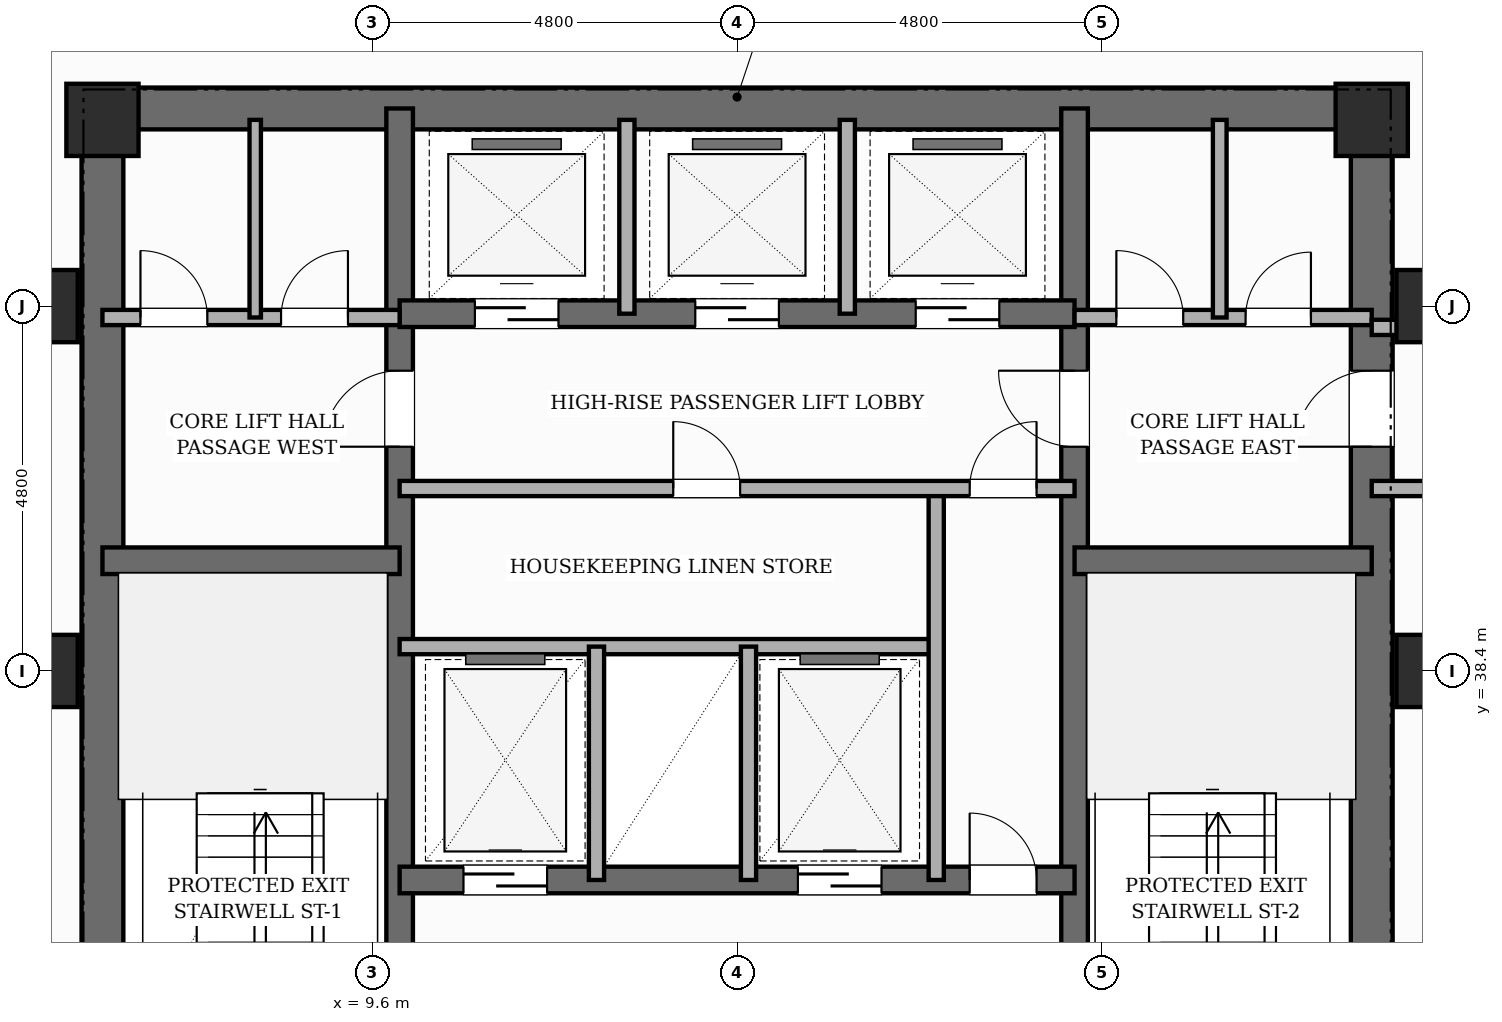
"""IFC4 building model, lengths in metres.
Left out: names, types, materials, properties, quantities, classifications, styles, units other than length and angle.
Written with IfcOpenShell. Run it as: python <this file> out.ifc"""

import sys

from ifc_helpers import new_model, si_unit, direction, frame, frame_2d, origin, origin_2d, place, context, subcontext, project, spatial, rectangle, extrude, element, fill, save


model = new_model("IFC4")
c1 = context("Model", 3, precision=1e-05, world=origin(), true_north=direction((0.0, 1.0)))
c2 = subcontext(c1, "Body", "Model", "MODEL_VIEW")
j1 = project(units=[si_unit("LENGTHUNIT", "METRE"), si_unit("PLANEANGLEUNIT", "RADIAN")], contexts=[c1])
p1 = place(None, origin())
s1 = spatial("IfcSite", under=j1, at=p1, CompositionType="ELEMENT")
p2 = place(p1, origin())
s2 = spatial("IfcBuilding", under=s1, at=p2, CompositionType="ELEMENT")
p3 = place(p2, frame((0.0, 0.0, 198.4)))
s3 = spatial("IfcBuildingStorey", under=s2, at=p3, CompositionType="ELEMENT", Elevation=198.4)
p4 = place(p3, frame((6.05, 30.625, 0.0), z_axis=(0.0, 0.0, 1.0), x_axis=(0.0, 1.0, 0.0)))
e1 = element("IfcWall", 1, at=p4, inside=s3, PredefinedType="SHEAR", context=c2, shape_type="SweptSolid", body=[
    extrude(rectangle(XDim=15.45, YDim=0.55, at=frame_2d((7.725, 0.0))), origin(), (0.0, 0.0, 1.0), 5.4),
])
p5 = place(p3, frame((22.75, 30.625, 0.0), z_axis=(0.0, 0.0, 1.0), x_axis=(0.0, 1.0, 0.0)))
e2 = element("IfcWall", 2, at=p5, inside=s3, PredefinedType="SHEAR", context=c2, shape_type="SweptSolid", body=[
    extrude(rectangle(XDim=15.45, YDim=0.55, at=frame_2d((7.725, 0.0))), origin(), (0.0, 0.0, 1.0), 5.4),
])
p6 = place(p5, frame((10.725, 0.0, 0.0)))
e3 = element("IfcOpeningElement", 3, at=p6, cuts=e2, PredefinedType="OPENING", context=c2, shape_type="SweptSolid", body=[
    extrude(rectangle(XDim=1.0, YDim=2.15, at=frame_2d((0.5, 1.075))), frame((0.0, 0.285, 0.0), z_axis=(0.0, -1.0, 0.0), x_axis=(1.0, 0.0, 0.0)), (0.0, 0.0, 1.0), 0.57),
])
p7 = place(p3, frame((6.05, 45.8, 0.0), z_axis=(0.0, 0.0, 1.0), x_axis=(1.0, 0.0, 0.0)))
e4 = element("IfcWall", 4, at=p7, inside=s3, PredefinedType="SHEAR", context=c2, shape_type="SweptSolid", body=[
    extrude(rectangle(XDim=16.7, YDim=0.55, at=frame_2d((8.35, 0.0))), origin(), (0.0, 0.0, 1.0), 5.4),
])
p8 = place(p3, frame((9.96, 30.9, 0.0), z_axis=(0.0, 0.0, 1.0), x_axis=(0.0, 1.0, 0.0)))
e5 = element("IfcWall", 5, at=p8, inside=s3, PredefinedType="SHEAR", context=c2, shape_type="SweptSolid", body=[
    extrude(rectangle(XDim=14.9, YDim=0.35, at=frame_2d((7.45, 0.0))), origin(), (0.0, 0.0, 1.0), 5.4),
])
p9 = place(p8, frame((0.65, 0.0, 0.0)))
e6 = element("IfcOpeningElement", 6, at=p9, cuts=e5, PredefinedType="OPENING", context=c2, shape_type="SweptSolid", body=[
    extrude(rectangle(XDim=0.95, YDim=2.1, at=frame_2d((0.475, 1.05))), frame((0.0, 0.185, 0.0), z_axis=(0.0, -1.0, 0.0), x_axis=(1.0, 0.0, 0.0)), (0.0, 0.0, 1.0), 0.37),
])
p10 = place(p8, frame((10.45, 0.0, 0.0)))
e7 = element("IfcOpeningElement", 7, at=p10, cuts=e5, PredefinedType="OPENING", context=c2, shape_type="SweptSolid", body=[
    extrude(rectangle(XDim=1.0, YDim=2.15, at=frame_2d((0.5, 1.075))), frame((0.0, 0.185, 0.0), z_axis=(0.0, -1.0, 0.0), x_axis=(1.0, 0.0, 0.0)), (0.0, 0.0, 1.0), 0.37),
])
p11 = place(p3, frame((18.84, 30.9, 0.0), z_axis=(0.0, 0.0, 1.0), x_axis=(0.0, 1.0, 0.0)))
e8 = element("IfcWall", 8, at=p11, inside=s3, PredefinedType="SHEAR", context=c2, shape_type="SweptSolid", body=[
    extrude(rectangle(XDim=14.9, YDim=0.35, at=frame_2d((7.45, 0.0))), origin(), (0.0, 0.0, 1.0), 5.4),
])
p12 = place(p11, frame((0.65, 0.0, 0.0)))
e9 = element("IfcOpeningElement", 9, at=p12, cuts=e8, PredefinedType="OPENING", context=c2, shape_type="SweptSolid", body=[
    extrude(rectangle(XDim=0.95, YDim=2.1, at=frame_2d((0.475, 1.05))), frame((0.0, 0.185, 0.0), z_axis=(0.0, -1.0, 0.0), x_axis=(1.0, 0.0, 0.0)), (0.0, 0.0, 1.0), 0.37),
])
p13 = place(p11, frame((10.45, 0.0, 0.0)))
e10 = element("IfcOpeningElement", 10, at=p13, cuts=e8, PredefinedType="OPENING", context=c2, shape_type="SweptSolid", body=[
    extrude(rectangle(XDim=1.0, YDim=2.15, at=frame_2d((0.5, 1.075))), frame((0.0, 0.185, 0.0), z_axis=(0.0, -1.0, 0.0), x_axis=(1.0, 0.0, 0.0)), (0.0, 0.0, 1.0), 0.37),
])
for number, where, z_axis, x_axis in (
    (11, (6.05, 39.85, 0.0), (0.0, 0.0, 1.0), (1.0, 0.0, 0.0)),
    (12, (18.84, 39.85, 0.0), (0.0, 0.0, 1.0), (1.0, 0.0, 0.0)),
):
    element("IfcWall", number, at=place(p3, frame(where, z_axis=z_axis, x_axis=x_axis)), inside=s3, PredefinedType="SHEAR", context=c2, shape_type="SweptSolid", body=[
        extrude(rectangle(XDim=3.91, YDim=0.35, at=frame_2d((1.955, 0.0))), origin(), (0.0, 0.0, 1.0), 5.4),
    ])
p14 = place(p3, frame((9.96, 35.65, 0.0), z_axis=(0.0, 0.0, 1.0), x_axis=(1.0, 0.0, 0.0)))
e13 = element("IfcWall", 13, at=p14, inside=s3, PredefinedType="SHEAR", context=c2, shape_type="SweptSolid", body=[
    extrude(rectangle(XDim=8.88, YDim=0.35, at=frame_2d((4.44, 0.0))), origin(), (0.0, 0.0, 1.0), 5.4),
])
p15 = place(p14, frame((0.84, 0.0, 0.0)))
e14 = element("IfcOpeningElement", 14, at=p15, cuts=e13, PredefinedType="OPENING", context=c2, shape_type="SweptSolid", body=[
    extrude(rectangle(XDim=1.1, YDim=2.15, at=frame_2d((0.55, 1.075))), frame((0.0, 0.185, 0.0), z_axis=(0.0, -1.0, 0.0), x_axis=(1.0, 0.0, 0.0)), (0.0, 0.0, 1.0), 0.37),
])
p16 = place(p14, frame((5.24, 0.0, 0.0)))
e15 = element("IfcOpeningElement", 15, at=p16, cuts=e13, PredefinedType="OPENING", context=c2, shape_type="SweptSolid", body=[
    extrude(rectangle(XDim=1.1, YDim=2.15, at=frame_2d((0.55, 1.075))), frame((0.0, 0.185, 0.0), z_axis=(0.0, -1.0, 0.0), x_axis=(1.0, 0.0, 0.0)), (0.0, 0.0, 1.0), 0.37),
])
p17 = place(p14, frame((7.5, 0.0, 0.0)))
e16 = element("IfcOpeningElement", 16, at=p17, cuts=e13, PredefinedType="OPENING", context=c2, shape_type="SweptSolid", body=[
    extrude(rectangle(XDim=0.88, YDim=2.1, at=frame_2d((0.44, 1.05))), frame((0.0, 0.185, 0.0), z_axis=(0.0, -1.0, 0.0), x_axis=(1.0, 0.0, 0.0)), (0.0, 0.0, 1.0), 0.37),
])
p18 = place(p3, frame((9.96, 43.1, 0.0), z_axis=(0.0, 0.0, 1.0), x_axis=(1.0, 0.0, 0.0)))
e17 = element("IfcWall", 17, at=p18, inside=s3, PredefinedType="SHEAR", context=c2, shape_type="SweptSolid", body=[
    extrude(rectangle(XDim=8.88, YDim=0.35, at=frame_2d((4.44, 0.0))), origin(), (0.0, 0.0, 1.0), 5.4),
])
p19 = place(p18, frame((0.99, 0.0, 0.0)))
e18 = element("IfcOpeningElement", 18, at=p19, cuts=e17, PredefinedType="OPENING", context=c2, shape_type="SweptSolid", body=[
    extrude(rectangle(XDim=1.1, YDim=2.15, at=frame_2d((0.55, 1.075))), frame((0.0, 0.185, 0.0), z_axis=(0.0, -1.0, 0.0), x_axis=(1.0, 0.0, 0.0)), (0.0, 0.0, 1.0), 0.37),
])
p20 = place(p18, frame((3.89, 0.0, 0.0)))
e19 = element("IfcOpeningElement", 19, at=p20, cuts=e17, PredefinedType="OPENING", context=c2, shape_type="SweptSolid", body=[
    extrude(rectangle(XDim=1.1, YDim=2.15, at=frame_2d((0.55, 1.075))), frame((0.0, 0.185, 0.0), z_axis=(0.0, -1.0, 0.0), x_axis=(1.0, 0.0, 0.0)), (0.0, 0.0, 1.0), 0.37),
])
p21 = place(p18, frame((6.79, 0.0, 0.0)))
e20 = element("IfcOpeningElement", 20, at=p21, cuts=e17, PredefinedType="OPENING", context=c2, shape_type="SweptSolid", body=[
    extrude(rectangle(XDim=1.1, YDim=2.15, at=frame_2d((0.55, 1.075))), frame((0.0, 0.185, 0.0), z_axis=(0.0, -1.0, 0.0), x_axis=(1.0, 0.0, 0.0)), (0.0, 0.0, 1.0), 0.37),
])
for number, where, z_axis, x_axis in (
    (21, (5.25, 38.4, 0.0), (0.0, 0.0, 1.0), (1.0, 0.0, 0.0)),
    (22, (5.25, 43.2, 0.0), (0.0, 0.0, 1.0), (1.0, 0.0, 0.0)),
    (23, (6.05, 45.65, 0.0), (0.0, 0.0, 1.0), (1.0, 0.0, 0.0)),
    (24, (22.75, 45.65, 0.0), (0.0, 0.0, 1.0), (1.0, 0.0, 0.0)),
    (25, (23.55, 38.4, 0.0), (0.0, 0.0, 1.0), (1.0, 0.0, 0.0)),
    (26, (23.55, 43.2, 0.0), (0.0, 0.0, 1.0), (1.0, 0.0, 0.0)),
):
    element("IfcColumn", number, at=place(p3, frame(where, z_axis=z_axis, x_axis=x_axis)), inside=s3, PredefinedType="COLUMN", context=c2, shape_type="SweptSolid", body=[
        extrude(rectangle(XDim=0.95, YDim=0.95, at=origin_2d()), origin(), (0.0, 0.0, 1.0), 5.4),
    ])
p22 = place(p3, frame((9.96, 38.72, 0.0), z_axis=(0.0, 0.0, 1.0), x_axis=(1.0, 0.0, 0.0)))
e27 = element("IfcWall", 27, at=p22, inside=s3, PredefinedType="POLYGONAL", context=c2, shape_type="SweptSolid", body=[
    extrude(rectangle(XDim=7.06, YDim=0.2, at=frame_2d((3.53, 0.0))), origin(), (0.0, 0.0, 1.0), 5.18),
])
for number, where, z_axis, x_axis in (
    (28, (12.55, 35.65, 0.0), (0.0, 0.0, 1.0), (0.0, 1.0, 0.0)),
    (29, (14.55, 35.65, 0.0), (0.0, 0.0, 1.0), (0.0, 1.0, 0.0)),
):
    element("IfcWall", number, at=place(p3, frame(where, z_axis=z_axis, x_axis=x_axis)), inside=s3, PredefinedType="POLYGONAL", context=c2, shape_type="SweptSolid", body=[
        extrude(rectangle(XDim=3.07, YDim=0.2, at=frame_2d((1.535, 0.0))), origin(), (0.0, 0.0, 1.0), 5.18),
    ])
p23 = place(p3, frame((17.02, 35.65, 0.0), z_axis=(0.0, 0.0, 1.0), x_axis=(0.0, 1.0, 0.0)))
e30 = element("IfcWall", 30, at=p23, inside=s3, PredefinedType="POLYGONAL", context=c2, shape_type="SweptSolid", body=[
    extrude(rectangle(XDim=5.15, YDim=0.2, at=frame_2d((2.575, 0.0))), origin(), (0.0, 0.0, 1.0), 5.18),
])
p24 = place(p3, frame((9.96, 40.8, 0.0), z_axis=(0.0, 0.0, 1.0), x_axis=(1.0, 0.0, 0.0)))
e31 = element("IfcWall", 31, at=p24, inside=s3, PredefinedType="POLYGONAL", context=c2, shape_type="SweptSolid", body=[
    extrude(rectangle(XDim=8.88, YDim=0.2, at=frame_2d((4.44, 0.0))), origin(), (0.0, 0.0, 1.0), 5.18),
])
p25 = place(p24, frame((7.5, 0.0, 0.0)))
e32 = element("IfcOpeningElement", 32, at=p25, cuts=e31, PredefinedType="OPENING", context=c2, shape_type="SweptSolid", body=[
    extrude(rectangle(XDim=0.88, YDim=2.1, at=frame_2d((0.44, 1.05))), frame((0.0, 0.11, 0.0), z_axis=(0.0, -1.0, 0.0), x_axis=(1.0, 0.0, 0.0)), (0.0, 0.0, 1.0), 0.22),
])
p26 = place(p24, frame((3.6, 0.0, 0.0)))
e33 = element("IfcOpeningElement", 33, at=p26, cuts=e31, PredefinedType="OPENING", context=c2, shape_type="SweptSolid", body=[
    extrude(rectangle(XDim=0.88, YDim=2.1, at=frame_2d((0.44, 1.05))), frame((0.0, 0.11, 0.0), z_axis=(0.0, -1.0, 0.0), x_axis=(1.0, 0.0, 0.0)), (0.0, 0.0, 1.0), 0.22),
])
p27 = place(p3, frame((18.84, 43.05, 0.0), z_axis=(0.0, 0.0, 1.0), x_axis=(1.0, 0.0, 0.0)))
e34 = element("IfcWall", 34, at=p27, inside=s3, PredefinedType="POLYGONAL", context=c2, shape_type="SweptSolid", body=[
    extrude(rectangle(XDim=3.91, YDim=0.2, at=frame_2d((1.955, 0.0))), origin(), (0.0, 0.0, 1.0), 4.46),
])
p28 = place(p27, frame((0.55, 0.0, 0.0)))
e35 = element("IfcOpeningElement", 35, at=p28, cuts=e34, PredefinedType="OPENING", context=c2, shape_type="SweptSolid", body=[
    extrude(rectangle(XDim=0.88, YDim=2.1, at=frame_2d((0.44, 1.05))), frame((0.0, 0.11, 0.0), z_axis=(0.0, -1.0, 0.0), x_axis=(1.0, 0.0, 0.0)), (0.0, 0.0, 1.0), 0.22),
])
p29 = place(p27, frame((2.25, 0.0, 0.0)))
e36 = element("IfcOpeningElement", 36, at=p29, cuts=e34, PredefinedType="OPENING", context=c2, shape_type="SweptSolid", body=[
    extrude(rectangle(XDim=0.86, YDim=2.1, at=frame_2d((0.43, 1.05))), frame((0.0, 0.11, 0.0), z_axis=(0.0, -1.0, 0.0), x_axis=(1.0, 0.0, 0.0)), (0.0, 0.0, 1.0), 0.22),
])
p30 = place(p3, frame((6.05, 43.05, 0.0), z_axis=(0.0, 0.0, 1.0), x_axis=(1.0, 0.0, 0.0)))
e37 = element("IfcWall", 37, at=p30, inside=s3, PredefinedType="POLYGONAL", context=c2, shape_type="SweptSolid", body=[
    extrude(rectangle(XDim=3.91, YDim=0.2, at=frame_2d((1.955, 0.0))), origin(), (0.0, 0.0, 1.0), 4.46),
])
p31 = place(p30, frame((0.5, 0.0, 0.0)))
e38 = element("IfcOpeningElement", 38, at=p31, cuts=e37, PredefinedType="OPENING", context=c2, shape_type="SweptSolid", body=[
    extrude(rectangle(XDim=0.88, YDim=2.1, at=frame_2d((0.44, 1.05))), frame((0.0, 0.11, 0.0), z_axis=(0.0, -1.0, 0.0), x_axis=(1.0, 0.0, 0.0)), (0.0, 0.0, 1.0), 0.22),
])
p32 = place(p30, frame((2.35, 0.0, 0.0)))
e39 = element("IfcOpeningElement", 39, at=p32, cuts=e37, PredefinedType="OPENING", context=c2, shape_type="SweptSolid", body=[
    extrude(rectangle(XDim=0.88, YDim=2.1, at=frame_2d((0.44, 1.05))), frame((0.0, 0.11, 0.0), z_axis=(0.0, -1.0, 0.0), x_axis=(1.0, 0.0, 0.0)), (0.0, 0.0, 1.0), 0.22),
])
for number, where, z_axis, x_axis in (
    (40, (12.95, 43.1, 0.0), (0.0, 0.0, 1.0), (0.0, 1.0, 0.0)),
    (41, (15.85, 43.1, 0.0), (0.0, 0.0, 1.0), (0.0, 1.0, 0.0)),
):
    element("IfcWall", number, at=place(p3, frame(where, z_axis=z_axis, x_axis=x_axis)), inside=s3, PredefinedType="POLYGONAL", context=c2, shape_type="SweptSolid", body=[
        extrude(rectangle(XDim=2.55, YDim=0.2, at=frame_2d((1.275, 0.0))), origin(), (0.0, 0.0, 1.0), 5.18),
    ])
p33 = place(p3, frame((8.06, 43.05, 0.0), z_axis=(0.0, 0.0, 1.0), x_axis=(0.0, 1.0, 0.0)))
e42 = element("IfcWall", 42, at=p33, inside=s3, PredefinedType="PARTITIONING", context=c2, shape_type="SweptSolid", body=[
    extrude(rectangle(XDim=2.6, YDim=0.15, at=frame_2d((1.3, 0.0))), origin(), (0.0, 0.0, 1.0), 5.18),
])
p34 = place(p3, frame((20.75, 43.05, 0.0), z_axis=(0.0, 0.0, 1.0), x_axis=(0.0, 1.0, 0.0)))
e43 = element("IfcWall", 43, at=p34, inside=s3, PredefinedType="PLUMBINGWALL", context=c2, shape_type="SweptSolid", body=[
    extrude(rectangle(XDim=2.6, YDim=0.18, at=frame_2d((1.3, 0.0))), origin(), (0.0, 0.0, 1.0), 5.18),
])
p35 = place(p3, frame((22.75, 40.8, 0.0), z_axis=(0.0, 0.0, 1.0), x_axis=(1.0, 0.0, 0.0)))
e44 = element("IfcWall", 44, at=p35, inside=s3, PredefinedType="PARTITIONING", context=c2, shape_type="SweptSolid", body=[
    extrude(rectangle(XDim=2.85, YDim=0.2, at=frame_2d((1.425, 0.0))), origin(), (0.0, 0.0, 1.0), 5.18),
])
p36 = place(p3, frame((22.75, 42.92, 0.0), z_axis=(0.0, 0.0, 1.0), x_axis=(1.0, 0.0, 0.0)))
e45 = element("IfcWall", 45, at=p36, inside=s3, PredefinedType="PARTITIONING", context=c2, shape_type="SweptSolid", body=[
    extrude(rectangle(XDim=1.33, YDim=0.2, at=frame_2d((0.665, 0.0))), origin(), (0.0, 0.0, 1.0), 4.46),
])
p37 = place(p15, origin())
e46 = element("IfcDoor", 46, at=p37, inside=s3, OperationType="SLIDING_TO_LEFT", PredefinedType="DOOR", context=c2, shape_type="SweptSolid", body=[
    extrude(rectangle(XDim=1.1, YDim=2.15, at=frame_2d((0.55, 1.075))), frame((0.0, 0.025, 0.0), z_axis=(0.0, -1.0, 0.0), x_axis=(1.0, 0.0, 0.0)), (0.0, 0.0, 1.0), 0.05),
])
fill(e14, e46)
p38 = place(p16, origin())
e47 = element("IfcDoor", 47, at=p38, inside=s3, OperationType="SLIDING_TO_RIGHT", PredefinedType="DOOR", context=c2, shape_type="SweptSolid", body=[
    extrude(rectangle(XDim=1.1, YDim=2.15, at=frame_2d((0.55, 1.075))), frame((0.0, 0.025, 0.0), z_axis=(0.0, -1.0, 0.0), x_axis=(1.0, 0.0, 0.0)), (0.0, 0.0, 1.0), 0.05),
])
fill(e15, e47)
p39 = place(p17, origin())
e48 = element("IfcDoor", 48, at=p39, inside=s3, OperationType="SINGLE_SWING_LEFT", PredefinedType="DOOR", context=c2, shape_type="SweptSolid", body=[
    extrude(rectangle(XDim=0.88, YDim=2.1, at=frame_2d((0.44, 1.05))), frame((0.0, 0.025, 0.0), z_axis=(0.0, -1.0, 0.0), x_axis=(1.0, 0.0, 0.0)), (0.0, 0.0, 1.0), 0.05),
])
fill(e16, e48)
p40 = place(p25, origin())
e49 = element("IfcDoor", 49, at=p40, inside=s3, OperationType="SINGLE_SWING_RIGHT", PredefinedType="DOOR", context=c2, shape_type="SweptSolid", body=[
    extrude(rectangle(XDim=0.88, YDim=2.1, at=frame_2d((0.44, 1.05))), frame((0.0, 0.025, 0.0), z_axis=(0.0, -1.0, 0.0), x_axis=(1.0, 0.0, 0.0)), (0.0, 0.0, 1.0), 0.05),
])
fill(e32, e49)
p41 = place(p19, origin())
e50 = element("IfcDoor", 50, at=p41, inside=s3, OperationType="SLIDING_TO_LEFT", PredefinedType="DOOR", context=c2, shape_type="SweptSolid", body=[
    extrude(rectangle(XDim=1.1, YDim=2.15, at=frame_2d((0.55, 1.075))), frame((0.0, 0.025, 0.0), z_axis=(0.0, -1.0, 0.0), x_axis=(1.0, 0.0, 0.0)), (0.0, 0.0, 1.0), 0.05),
])
fill(e18, e50)
p42 = place(p20, origin())
e51 = element("IfcDoor", 51, at=p42, inside=s3, OperationType="SLIDING_TO_RIGHT", PredefinedType="DOOR", context=c2, shape_type="SweptSolid", body=[
    extrude(rectangle(XDim=1.1, YDim=2.15, at=frame_2d((0.55, 1.075))), frame((0.0, 0.025, 0.0), z_axis=(0.0, -1.0, 0.0), x_axis=(1.0, 0.0, 0.0)), (0.0, 0.0, 1.0), 0.05),
])
fill(e19, e51)
p43 = place(p21, origin())
e52 = element("IfcDoor", 52, at=p43, inside=s3, OperationType="SLIDING_TO_LEFT", PredefinedType="DOOR", context=c2, shape_type="SweptSolid", body=[
    extrude(rectangle(XDim=1.1, YDim=2.15, at=frame_2d((0.55, 1.075))), frame((0.0, 0.025, 0.0), z_axis=(0.0, -1.0, 0.0), x_axis=(1.0, 0.0, 0.0)), (0.0, 0.0, 1.0), 0.05),
])
fill(e20, e52)
p44 = place(p10, origin())
e53 = element("IfcDoor", 53, at=p44, inside=s3, OperationType="SINGLE_SWING_LEFT", PredefinedType="DOOR", context=c2, shape_type="SweptSolid", body=[
    extrude(rectangle(XDim=1.0, YDim=2.15, at=frame_2d((0.5, 1.075))), frame((0.0, 0.025, 0.0), z_axis=(0.0, -1.0, 0.0), x_axis=(1.0, 0.0, 0.0)), (0.0, 0.0, 1.0), 0.05),
])
fill(e7, e53)
p45 = place(p13, origin())
e54 = element("IfcDoor", 54, at=p45, inside=s3, OperationType="SINGLE_SWING_RIGHT", PredefinedType="DOOR", context=c2, shape_type="SweptSolid", body=[
    extrude(rectangle(XDim=1.0, YDim=2.15, at=frame_2d((0.5, 1.075))), frame((0.0, 0.025, 0.0), z_axis=(0.0, -1.0, 0.0), x_axis=(1.0, 0.0, 0.0)), (0.0, 0.0, 1.0), 0.05),
])
fill(e10, e54)
p46 = place(p6, origin())
e55 = element("IfcDoor", 55, at=p46, inside=s3, OperationType="SINGLE_SWING_LEFT", PredefinedType="DOOR", context=c2, shape_type="SweptSolid", body=[
    extrude(rectangle(XDim=1.0, YDim=2.15, at=frame_2d((0.5, 1.075))), frame((0.0, 0.025, 0.0), z_axis=(0.0, -1.0, 0.0), x_axis=(1.0, 0.0, 0.0)), (0.0, 0.0, 1.0), 0.05),
])
fill(e3, e55)
p47 = place(p31, origin())
e56 = element("IfcDoor", 56, at=p47, inside=s3, OperationType="SINGLE_SWING_LEFT", PredefinedType="DOOR", context=c2, shape_type="SweptSolid", body=[
    extrude(rectangle(XDim=0.88, YDim=2.1, at=frame_2d((0.44, 1.05))), frame((0.0, 0.025, 0.0), z_axis=(0.0, -1.0, 0.0), x_axis=(1.0, 0.0, 0.0)), (0.0, 0.0, 1.0), 0.05),
])
fill(e38, e56)
p48 = place(p32, origin())
e57 = element("IfcDoor", 57, at=p48, inside=s3, OperationType="SINGLE_SWING_RIGHT", PredefinedType="DOOR", context=c2, shape_type="SweptSolid", body=[
    extrude(rectangle(XDim=0.88, YDim=2.1, at=frame_2d((0.44, 1.05))), frame((0.0, 0.025, 0.0), z_axis=(0.0, -1.0, 0.0), x_axis=(1.0, 0.0, 0.0)), (0.0, 0.0, 1.0), 0.05),
])
fill(e39, e57)
p49 = place(p26, origin())
e58 = element("IfcDoor", 58, at=p49, inside=s3, OperationType="SINGLE_SWING_LEFT", PredefinedType="DOOR", context=c2, shape_type="SweptSolid", body=[
    extrude(rectangle(XDim=0.88, YDim=2.1, at=frame_2d((0.44, 1.05))), frame((0.0, 0.025, 0.0), z_axis=(0.0, -1.0, 0.0), x_axis=(1.0, 0.0, 0.0)), (0.0, 0.0, 1.0), 0.05),
])
fill(e33, e58)
p50 = place(p28, origin())
e59 = element("IfcDoor", 59, at=p50, inside=s3, OperationType="SINGLE_SWING_LEFT", PredefinedType="DOOR", context=c2, shape_type="SweptSolid", body=[
    extrude(rectangle(XDim=0.88, YDim=2.1, at=frame_2d((0.44, 1.05))), frame((0.0, 0.025, 0.0), z_axis=(0.0, -1.0, 0.0), x_axis=(1.0, 0.0, 0.0)), (0.0, 0.0, 1.0), 0.05),
])
fill(e35, e59)
p51 = place(p29, origin())
e60 = element("IfcDoor", 60, at=p51, inside=s3, OperationType="SINGLE_SWING_RIGHT", PredefinedType="DOOR", context=c2, shape_type="SweptSolid", body=[
    extrude(rectangle(XDim=0.86, YDim=2.1, at=frame_2d((0.43, 1.05))), frame((0.0, 0.025, 0.0), z_axis=(0.0, -1.0, 0.0), x_axis=(1.0, 0.0, 0.0)), (0.0, 0.0, 1.0), 0.05),
])
fill(e36, e60)
save(model, sys.argv[1])
